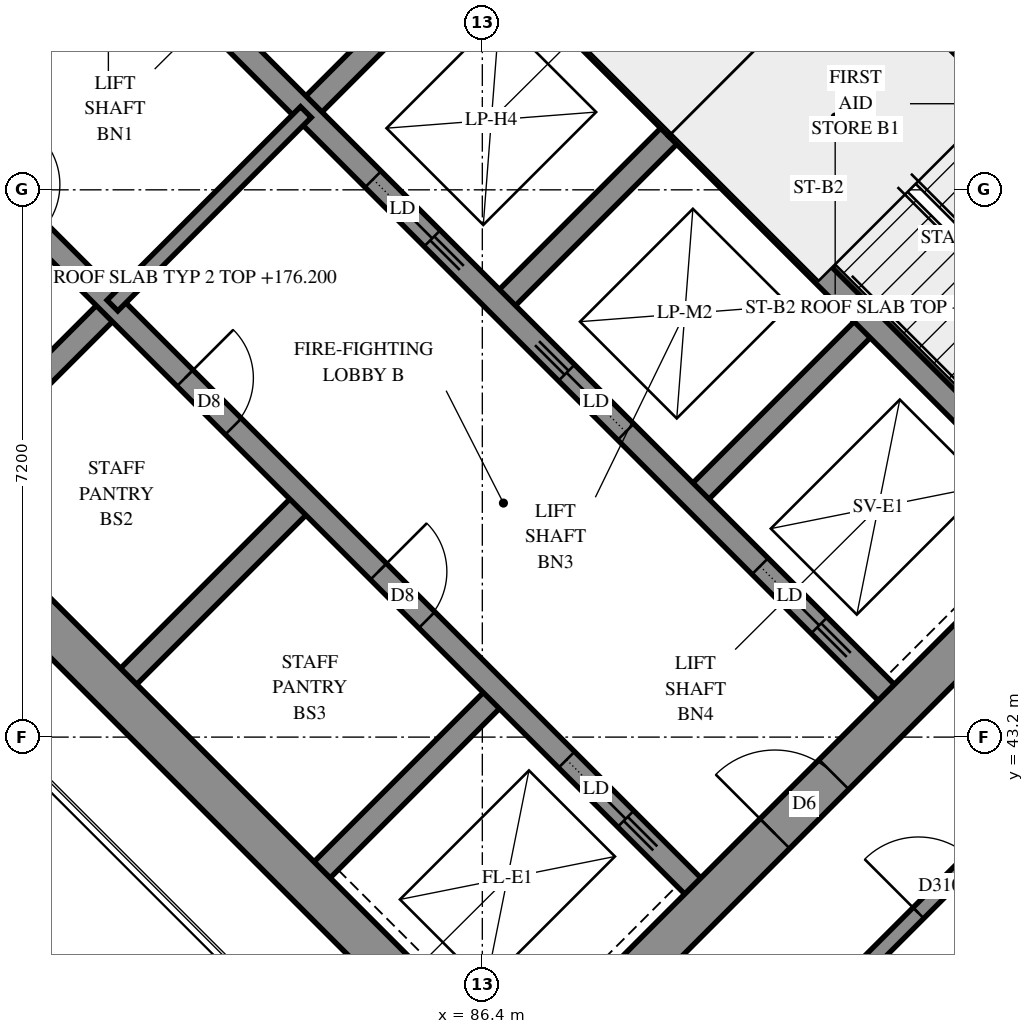
"""IFC4 building model, lengths in metres.
Left out: names, types, materials, properties, quantities, classifications, styles, units other than length and angle.
Written with IfcOpenShell. Run it as: python <this file> out.ifc"""

import sys

from ifc_helpers import new_model, si_unit, direction, frame, frame_2d, origin, place, context, subcontext, project, spatial, polyline, rectangle, outline, extrude, element, fill, save


model = new_model("IFC4")
c1 = context("Model", 3, precision=1e-05, world=origin(), true_north=direction((0.0, 1.0)))
c2 = subcontext(c1, "Body", "Model", "MODEL_VIEW")
j1 = project(units=[si_unit("LENGTHUNIT", "METRE"), si_unit("PLANEANGLEUNIT", "RADIAN")], contexts=[c1])
p1 = place(None, origin())
s1 = spatial("IfcSite", under=j1, at=p1, CompositionType="ELEMENT")
p2 = place(p1, origin())
s2 = spatial("IfcBuilding", under=s1, at=p2, CompositionType="ELEMENT")
p3 = place(p2, frame((0.0, 0.0, 176.2)))
s3 = spatial("IfcBuildingStorey", under=s2, at=p3, CompositionType="ELEMENT", Elevation=176.2)
p4 = place(p3, frame((76.071, 49.284, -0.3), z_axis=(0.0, 0.0, 1.0), x_axis=(0.7071035554, -0.707110007, 0.0)))
e1 = element("IfcWall", 1, at=p4, inside=s3, PredefinedType="SHEAR", context=c2, shape_type="SweptSolid", body=[
    extrude(rectangle(XDim=15.5, YDim=0.55, at=frame_2d((7.75, 0.0))), origin(), (0.0, 0.0, 1.0), 3.5),
])
p5 = place(p3, frame((86.642, 59.855, -0.3), z_axis=(0.0, 0.0, 1.0), x_axis=(0.707110007, -0.7071035554, 0.0)))
e2 = element("IfcWall", 2, at=p5, inside=s3, PredefinedType="SHEAR", context=c2, shape_type="SweptSolid", body=[
    extrude(rectangle(XDim=15.5, YDim=0.55, at=frame_2d((7.75, 0.0))), origin(), (0.0, 0.0, 1.0), 3.5),
])
p6 = place(p5, frame((10.55, 0.0, 0.3)))
e3 = element("IfcOpeningElement", 3, at=p6, cuts=e2, PredefinedType="OPENING", context=c2, shape_type="SweptSolid", body=[
    extrude(rectangle(XDim=0.8, YDim=2.1, at=frame_2d((0.4, 1.05))), frame((0.0, 0.285, 0.0), z_axis=(0.0, -1.0, 0.0), x_axis=(1.0, 0.0, 0.0)), (0.0, 0.0, 1.0), 0.57),
])
p7 = place(p3, frame((76.46, 49.284, -0.3), z_axis=(0.0, 0.0, 1.0), x_axis=(0.7071067812, 0.7071067812, 0.0)))
e4 = element("IfcWall", 4, at=p7, inside=s3, PredefinedType="SHEAR", context=c2, shape_type="SweptSolid", body=[
    extrude(rectangle(XDim=14.4, YDim=0.55, at=frame_2d((7.2, 0.0))), origin(), (0.0, 0.0, 1.0), 3.5),
])
p8 = place(p7, frame((4.55, 0.0, 0.3)))
e5 = element("IfcOpeningElement", 5, at=p8, cuts=e4, PredefinedType="OPENING", context=c2, shape_type="SweptSolid", body=[
    extrude(rectangle(XDim=1.1, YDim=2.1, at=frame_2d((0.55, 1.05))), frame((0.0, 0.285, 0.0), z_axis=(0.0, -1.0, 0.0), x_axis=(1.0, 0.0, 0.0)), (0.0, 0.0, 1.0), 0.57),
])
p9 = place(p7, frame((11.35, 0.0, 0.3)))
e6 = element("IfcOpeningElement", 6, at=p9, cuts=e4, PredefinedType="OPENING", context=c2, shape_type="SweptSolid", body=[
    extrude(rectangle(XDim=1.1, YDim=2.1, at=frame_2d((0.55, 1.05))), frame((0.0, 0.285, 0.0), z_axis=(0.0, -1.0, 0.0), x_axis=(1.0, 0.0, 0.0)), (0.0, 0.0, 1.0), 0.57),
])
p10 = place(p3, frame((87.031, 38.713, -0.3), z_axis=(0.0, 0.0, 1.0), x_axis=(0.707103309, 0.7071102534, 0.0)))
e7 = element("IfcWall", 7, at=p10, inside=s3, PredefinedType="SHEAR", context=c2, shape_type="SweptSolid", body=[
    extrude(rectangle(XDim=14.4, YDim=0.55, at=frame_2d((7.2, 0.0))), origin(), (0.0, 0.0, 1.0), 3.5),
])
p11 = place(p10, frame((4.55, 0.0, 0.3)))
e8 = element("IfcOpeningElement", 8, at=p11, cuts=e7, PredefinedType="OPENING", context=c2, shape_type="SweptSolid", body=[
    extrude(rectangle(XDim=1.1, YDim=2.1, at=frame_2d((0.55, 1.05))), frame((0.0, 0.285, 0.0), z_axis=(0.0, -1.0, 0.0), x_axis=(1.0, 0.0, 0.0)), (0.0, 0.0, 1.0), 0.57),
])
p12 = place(p10, frame((11.35, 0.0, 0.3)))
e9 = element("IfcOpeningElement", 9, at=p12, cuts=e7, PredefinedType="OPENING", context=c2, shape_type="SweptSolid", body=[
    extrude(rectangle(XDim=1.1, YDim=2.1, at=frame_2d((0.55, 1.05))), frame((0.0, 0.285, 0.0), z_axis=(0.0, -1.0, 0.0), x_axis=(1.0, 0.0, 0.0)), (0.0, 0.0, 1.0), 0.57),
])
for number, where, z_axis, x_axis in (
    (10, (79.2, 46.544, 0.0), (0.0, 0.0, 1.0), (0.707, 0.707, 0.0)),
    (11, (84.079, 51.423, 0.0), (0.0, 0.0, 1.0), (0.707, 0.707, 0.0)),
):
    element("IfcWall", number, at=place(p3, frame(where, z_axis=z_axis, x_axis=x_axis)), inside=s3, PredefinedType="SOLIDWALL", context=c2, shape_type="SweptSolid", body=[
        extrude(rectangle(XDim=3.3, YDim=0.3, at=frame_2d((1.65, 0.0))), origin(), (0.0, 0.0, 1.0), 3.9),
    ])
p13 = place(p3, frame((81.746, 43.999, 0.0), z_axis=(0.0, 0.0, 1.0), x_axis=(0.7071067812, 0.7071067812, 0.0)))
e12 = element("IfcWall", 12, at=p13, inside=s3, PredefinedType="SOLIDWALL", context=c2, shape_type="SweptSolid", body=[
    extrude(rectangle(XDim=3.3, YDim=0.3, at=frame_2d((1.65, 0.0))), origin(), (0.0, 0.0, 1.0), 3.9),
])
p14 = place(p3, frame((86.625, 48.878, 0.0), z_axis=(0.0, 0.0, 1.0), x_axis=(0.7071067812, 0.7071067812, 0.0)))
e13 = element("IfcWall", 13, at=p14, inside=s3, PredefinedType="SOLIDWALL", context=c2, shape_type="SweptSolid", body=[
    extrude(rectangle(XDim=3.3, YDim=0.3, at=frame_2d((1.65, 0.0))), origin(), (0.0, 0.0, 1.0), 3.9),
])
p15 = place(p3, frame((84.291, 41.453, 0.0), z_axis=(0.0, 0.0, 1.0), x_axis=(0.7071067812, 0.7071067812, 0.0)))
e14 = element("IfcWall", 14, at=p15, inside=s3, PredefinedType="SOLIDWALL", context=c2, shape_type="SweptSolid", body=[
    extrude(rectangle(XDim=3.3, YDim=0.3, at=frame_2d((1.65, 0.0))), origin(), (0.0, 0.0, 1.0), 3.9),
])
p16 = place(p3, frame((89.17, 46.332, 0.0), z_axis=(0.0, 0.0, 1.0), x_axis=(0.7071067812, 0.7071067812, 0.0)))
e15 = element("IfcWall", 15, at=p16, inside=s3, PredefinedType="SOLIDWALL", context=c2, shape_type="SweptSolid", body=[
    extrude(rectangle(XDim=3.3, YDim=0.3, at=frame_2d((1.65, 0.0))), origin(), (0.0, 0.0, 1.0), 3.9),
])
p17 = place(p3, frame((78.988, 51.423, 0.0), z_axis=(0.0, 0.0, 1.0), x_axis=(0.7071067812, -0.7071067812, 0.0)))
e16 = element("IfcWall", 16, at=p17, inside=s3, PredefinedType="SOLIDWALL", context=c2, shape_type="SweptSolid", body=[
    extrude(rectangle(XDim=14.4, YDim=0.3, at=frame_2d((7.2, 0.0))), origin(), (0.0, 0.0, 1.0), 3.9),
])
p18 = place(p17, frame((1.35, 0.0, 0.0)))
e17 = element("IfcOpeningElement", 17, at=p18, cuts=e16, PredefinedType="OPENING", context=c2, shape_type="SweptSolid", body=[
    extrude(rectangle(XDim=0.9, YDim=2.1, at=frame_2d((0.45, 1.05))), frame((0.0, 0.16, 0.0), z_axis=(0.0, -1.0, 0.0), x_axis=(1.0, 0.0, 0.0)), (0.0, 0.0, 1.0), 0.32),
])
p19 = place(p17, frame((4.95, 0.0, 0.0)))
e18 = element("IfcOpeningElement", 18, at=p19, cuts=e16, PredefinedType="OPENING", context=c2, shape_type="SweptSolid", body=[
    extrude(rectangle(XDim=0.9, YDim=2.1, at=frame_2d((0.45, 1.05))), frame((0.0, 0.16, 0.0), z_axis=(0.0, -1.0, 0.0), x_axis=(1.0, 0.0, 0.0)), (0.0, 0.0, 1.0), 0.32),
])
p20 = place(p17, frame((8.55, 0.0, 0.0)))
e19 = element("IfcOpeningElement", 19, at=p20, cuts=e16, PredefinedType="OPENING", context=c2, shape_type="SweptSolid", body=[
    extrude(rectangle(XDim=0.9, YDim=2.1, at=frame_2d((0.45, 1.05))), frame((0.0, 0.16, 0.0), z_axis=(0.0, -1.0, 0.0), x_axis=(1.0, 0.0, 0.0)), (0.0, 0.0, 1.0), 0.32),
])
p21 = place(p17, frame((12.05, 0.0, 0.0)))
e20 = element("IfcOpeningElement", 20, at=p21, cuts=e16, PredefinedType="OPENING", context=c2, shape_type="SweptSolid", body=[
    extrude(rectangle(XDim=1.1, YDim=2.1, at=frame_2d((0.55, 1.05))), frame((0.0, 0.16, 0.0), z_axis=(0.0, -1.0, 0.0), x_axis=(1.0, 0.0, 0.0)), (0.0, 0.0, 1.0), 0.32),
])
p22 = place(p3, frame((81.534, 53.969, 0.0), z_axis=(0.0, 0.0, 1.0), x_axis=(0.707103309, -0.7071102534, 0.0)))
e21 = element("IfcWall", 21, at=p22, inside=s3, PredefinedType="SOLIDWALL", context=c2, shape_type="SweptSolid", body=[
    extrude(rectangle(XDim=14.4, YDim=0.3, at=frame_2d((7.2, 0.0))), origin(), (0.0, 0.0, 1.0), 3.9),
])
p23 = place(p22, frame((1.25, 0.0, 0.0)))
e22 = element("IfcOpeningElement", 22, at=p23, cuts=e21, PredefinedType="OPENING", context=c2, shape_type="SweptSolid", body=[
    extrude(rectangle(XDim=1.1, YDim=2.1, at=frame_2d((0.55, 1.05))), frame((0.0, 0.16, 0.0), z_axis=(0.0, -1.0, 0.0), x_axis=(1.0, 0.0, 0.0)), (0.0, 0.0, 1.0), 0.32),
])
p24 = place(p22, frame((4.85, 0.0, 0.0)))
e23 = element("IfcOpeningElement", 23, at=p24, cuts=e21, PredefinedType="OPENING", context=c2, shape_type="SweptSolid", body=[
    extrude(rectangle(XDim=1.1, YDim=2.1, at=frame_2d((0.55, 1.05))), frame((0.0, 0.16, 0.0), z_axis=(0.0, -1.0, 0.0), x_axis=(1.0, 0.0, 0.0)), (0.0, 0.0, 1.0), 0.32),
])
p25 = place(p22, frame((8.45, 0.0, 0.0)))
e24 = element("IfcOpeningElement", 24, at=p25, cuts=e21, PredefinedType="OPENING", context=c2, shape_type="SweptSolid", body=[
    extrude(rectangle(XDim=1.1, YDim=2.1, at=frame_2d((0.55, 1.05))), frame((0.0, 0.16, 0.0), z_axis=(0.0, -1.0, 0.0), x_axis=(1.0, 0.0, 0.0)), (0.0, 0.0, 1.0), 0.32),
])
p26 = place(p22, frame((12.05, 0.0, 0.0)))
e25 = element("IfcOpeningElement", 25, at=p26, cuts=e21, PredefinedType="OPENING", context=c2, shape_type="SweptSolid", body=[
    extrude(rectangle(XDim=1.1, YDim=2.1, at=frame_2d((0.55, 1.05))), frame((0.0, 0.16, 0.0), z_axis=(0.0, -1.0, 0.0), x_axis=(1.0, 0.0, 0.0)), (0.0, 0.0, 1.0), 0.32),
])
for number, where, z_axis, x_axis in (
    (26, (83.867, 56.302, 0.0), (0.0, 0.0, 1.0), (0.707, -0.707, 0.0)),
    (27, (88.958, 51.211, 0.0), (0.0, 0.0, 1.0), (0.707, -0.707, 0.0)),
):
    element("IfcWall", number, at=place(p3, frame(where, z_axis=z_axis, x_axis=x_axis)), inside=s3, PredefinedType="SOLIDWALL", context=c2, shape_type="SweptSolid", body=[
        extrude(rectangle(XDim=7.2, YDim=0.3, at=frame_2d((3.6, 0.0))), origin(), (0.0, 0.0, 1.0), 3.9),
    ])
p27 = place(p3, frame((88.958, 51.211, 0.0), z_axis=(0.0, 0.0, 1.0), x_axis=(0.7071067812, 0.7071067812, 0.0)))
e28 = element("IfcWall", 28, at=p27, inside=s3, PredefinedType="SOLIDWALL", context=c2, shape_type="SweptSolid", body=[
    extrude(rectangle(XDim=4.2, YDim=0.3, at=frame_2d((2.1, 0.0))), origin(), (0.0, 0.0, 1.0), 3.9),
])
p28 = place(p3, frame((102.747, 49.938, 0.0), z_axis=(0.0, 0.0, 1.0), x_axis=(-0.7071083109, 0.7071052514, 0.0)))
e29 = element("IfcWall", 29, at=p28, inside=s3, PredefinedType="SOLIDWALL", context=c2, shape_type="SweptSolid", body=[
    extrude(outline(polyline([(-0.1, -0.1), (32.726, -0.1), (32.644, 0.1), (0.1, 0.1), (-0.1, -0.1)])), origin(), (0.0, 0.0, 1.0), 4.2),
])
p29 = place(p3, frame((77.018, 42.15, 0.0), z_axis=(0.0, 0.0, 1.0), x_axis=(0.7071039217, -0.7071096407, 0.0)))
e30 = element("IfcWall", 30, at=p29, inside=s3, PredefinedType="SOLIDWALL", context=c2, shape_type="SweptSolid", body=[
    extrude(outline(polyline([(0.041, -0.1), (17.586, -0.1), (17.386, 0.1), (-0.041, 0.1), (0.041, -0.1)])), origin(), (0.0, 0.0, 1.0), 4.2),
])
p30 = place(p3, frame((89.382, 29.786, 0.0), z_axis=(0.0, 0.0, 1.0), x_axis=(0.7071094267, 0.7071041357, 0.0)))
e31 = element("IfcWall", 31, at=p30, inside=s3, PredefinedType="SOLIDWALL", context=c2, shape_type="SweptSolid", body=[
    extrude(outline(polyline([(-0.1, -0.1), (19.0, -0.1), (18.8, 0.1), (0.1, 0.1), (-0.1, -0.1)])), origin(), (0.0, 0.0, 1.0), 4.2),
])
p31 = place(p3, frame((91.313, 53.354, 0.0), z_axis=(0.0, 0.0, 1.0), x_axis=(0.7071147811, -0.7070987812, 0.0)))
e32 = element("IfcWall", 32, at=p31, inside=s3, PredefinedType="PARTITIONING", context=c2, shape_type="SweptSolid", body=[
    extrude(rectangle(XDim=6.25, YDim=0.15, at=frame_2d((3.125, 0.0))), origin(), (0.0, 0.0, 1.0), 3.9),
])
p32 = place(p3, frame((81.534, 48.878, 0.0), z_axis=(0.0, 0.0, 1.0), x_axis=(0.707092892, 0.7071206701, 0.0)))
e33 = element("IfcWall", 33, at=p32, inside=s3, PredefinedType="PARTITIONING", context=c2, shape_type="SweptSolid", body=[
    extrude(rectangle(XDim=3.6, YDim=0.2, at=frame_2d((1.8, 0.0))), origin(), (0.0, 0.0, 1.0), 3.9),
])
p33 = place(p3, frame((87.317, 36.066, 0.0), z_axis=(0.0, 0.0, 1.0), x_axis=(0.7071067812, 0.7071067812, 0.0)))
e34 = element("IfcWall", 34, at=p33, inside=s3, PredefinedType="PARTITIONING", context=c2, shape_type="SweptSolid", body=[
    extrude(rectangle(XDim=7.971, YDim=0.2, at=frame_2d((3.985, 0.0))), origin(), (0.0, 0.0, 1.0), 3.9),
])
p34 = place(p33, frame((6.818, 0.0, 0.0)))
e35 = element("IfcOpeningElement", 35, at=p34, cuts=e34, PredefinedType="OPENING", context=c2, shape_type="SweptSolid", body=[
    extrude(rectangle(XDim=1.0, YDim=2.1, at=frame_2d((0.5, 1.05))), frame((0.0, 0.11, 0.0), z_axis=(0.0, -1.0, 0.0), x_axis=(1.0, 0.0, 0.0)), (0.0, 0.0, 1.0), 0.22),
])
p35 = place(p3, frame((88.205, 35.179, 0.0), z_axis=(0.0, 0.0, 1.0), x_axis=(0.7072322548, 0.7069812853, 0.0)))
e36 = element("IfcWall", 36, at=p35, inside=s3, PredefinedType="PARTITIONING", context=c2, shape_type="SweptSolid", body=[
    extrude(rectangle(XDim=7.969, YDim=0.2, at=frame_2d((3.985, 0.0))), origin(), (0.0, 0.0, 1.0), 3.9),
])
p36 = place(p11, origin())
e37 = element("IfcDoor", 37, at=p36, inside=s3, OperationType="DOUBLE_DOOR_SINGLE_SWING", PredefinedType="DOOR", context=c2, shape_type="SweptSolid", body=[
    extrude(rectangle(XDim=1.1, YDim=2.1, at=frame_2d((0.55, 1.05))), frame((0.0, 0.025, 0.0), z_axis=(0.0, -1.0, 0.0), x_axis=(1.0, 0.0, 0.0)), (0.0, 0.0, 1.0), 0.05),
])
fill(e8, e37)
p37 = place(p19, origin())
e38 = element("IfcDoor", 38, at=p37, inside=s3, OperationType="SINGLE_SWING_LEFT", PredefinedType="DOOR", context=c2, shape_type="SweptSolid", body=[
    extrude(rectangle(XDim=0.9, YDim=2.1, at=frame_2d((0.45, 1.05))), frame((0.0, 0.025, 0.0), z_axis=(0.0, -1.0, 0.0), x_axis=(1.0, 0.0, 0.0)), (0.0, 0.0, 1.0), 0.05),
])
fill(e18, e38)
p38 = place(p20, origin())
e39 = element("IfcDoor", 39, at=p38, inside=s3, OperationType="SINGLE_SWING_LEFT", PredefinedType="DOOR", context=c2, shape_type="SweptSolid", body=[
    extrude(rectangle(XDim=0.9, YDim=2.1, at=frame_2d((0.45, 1.05))), frame((0.0, 0.025, 0.0), z_axis=(0.0, -1.0, 0.0), x_axis=(1.0, 0.0, 0.0)), (0.0, 0.0, 1.0), 0.05),
])
fill(e19, e39)
p39 = place(p21, origin())
e40 = element("IfcDoor", 40, at=p39, inside=s3, OperationType="SLIDING_TO_RIGHT", PredefinedType="DOOR", context=c2, shape_type="SweptSolid", body=[
    extrude(rectangle(XDim=1.1, YDim=2.1, at=frame_2d((0.55, 1.05))), frame((0.0, 0.025, 0.0), z_axis=(0.0, -1.0, 0.0), x_axis=(1.0, 0.0, 0.0)), (0.0, 0.0, 1.0), 0.05),
])
fill(e20, e40)
p40 = place(p24, origin())
e41 = element("IfcDoor", 41, at=p40, inside=s3, OperationType="SLIDING_TO_RIGHT", PredefinedType="DOOR", context=c2, shape_type="SweptSolid", body=[
    extrude(rectangle(XDim=1.1, YDim=2.1, at=frame_2d((0.55, 1.05))), frame((0.0, 0.025, 0.0), z_axis=(0.0, -1.0, 0.0), x_axis=(1.0, 0.0, 0.0)), (0.0, 0.0, 1.0), 0.05),
])
fill(e23, e41)
p41 = place(p25, origin())
e42 = element("IfcDoor", 42, at=p41, inside=s3, OperationType="SLIDING_TO_LEFT", PredefinedType="DOOR", context=c2, shape_type="SweptSolid", body=[
    extrude(rectangle(XDim=1.1, YDim=2.1, at=frame_2d((0.55, 1.05))), frame((0.0, 0.025, 0.0), z_axis=(0.0, -1.0, 0.0), x_axis=(1.0, 0.0, 0.0)), (0.0, 0.0, 1.0), 0.05),
])
fill(e24, e42)
p42 = place(p26, origin())
e43 = element("IfcDoor", 43, at=p42, inside=s3, OperationType="SLIDING_TO_RIGHT", PredefinedType="DOOR", context=c2, shape_type="SweptSolid", body=[
    extrude(rectangle(XDim=1.1, YDim=2.1, at=frame_2d((0.55, 1.05))), frame((0.0, 0.025, 0.0), z_axis=(0.0, -1.0, 0.0), x_axis=(1.0, 0.0, 0.0)), (0.0, 0.0, 1.0), 0.05),
])
fill(e25, e43)
p43 = place(p34, origin())
e44 = element("IfcDoor", 44, at=p43, inside=s3, OperationType="SINGLE_SWING_LEFT", PredefinedType="DOOR", context=c2, shape_type="SweptSolid", body=[
    extrude(rectangle(XDim=1.0, YDim=2.1, at=frame_2d((0.5, 1.05))), frame((0.0, 0.025, 0.0), z_axis=(0.0, -1.0, 0.0), x_axis=(1.0, 0.0, 0.0)), (0.0, 0.0, 1.0), 0.05),
])
fill(e35, e44)
save(model, sys.argv[1])
